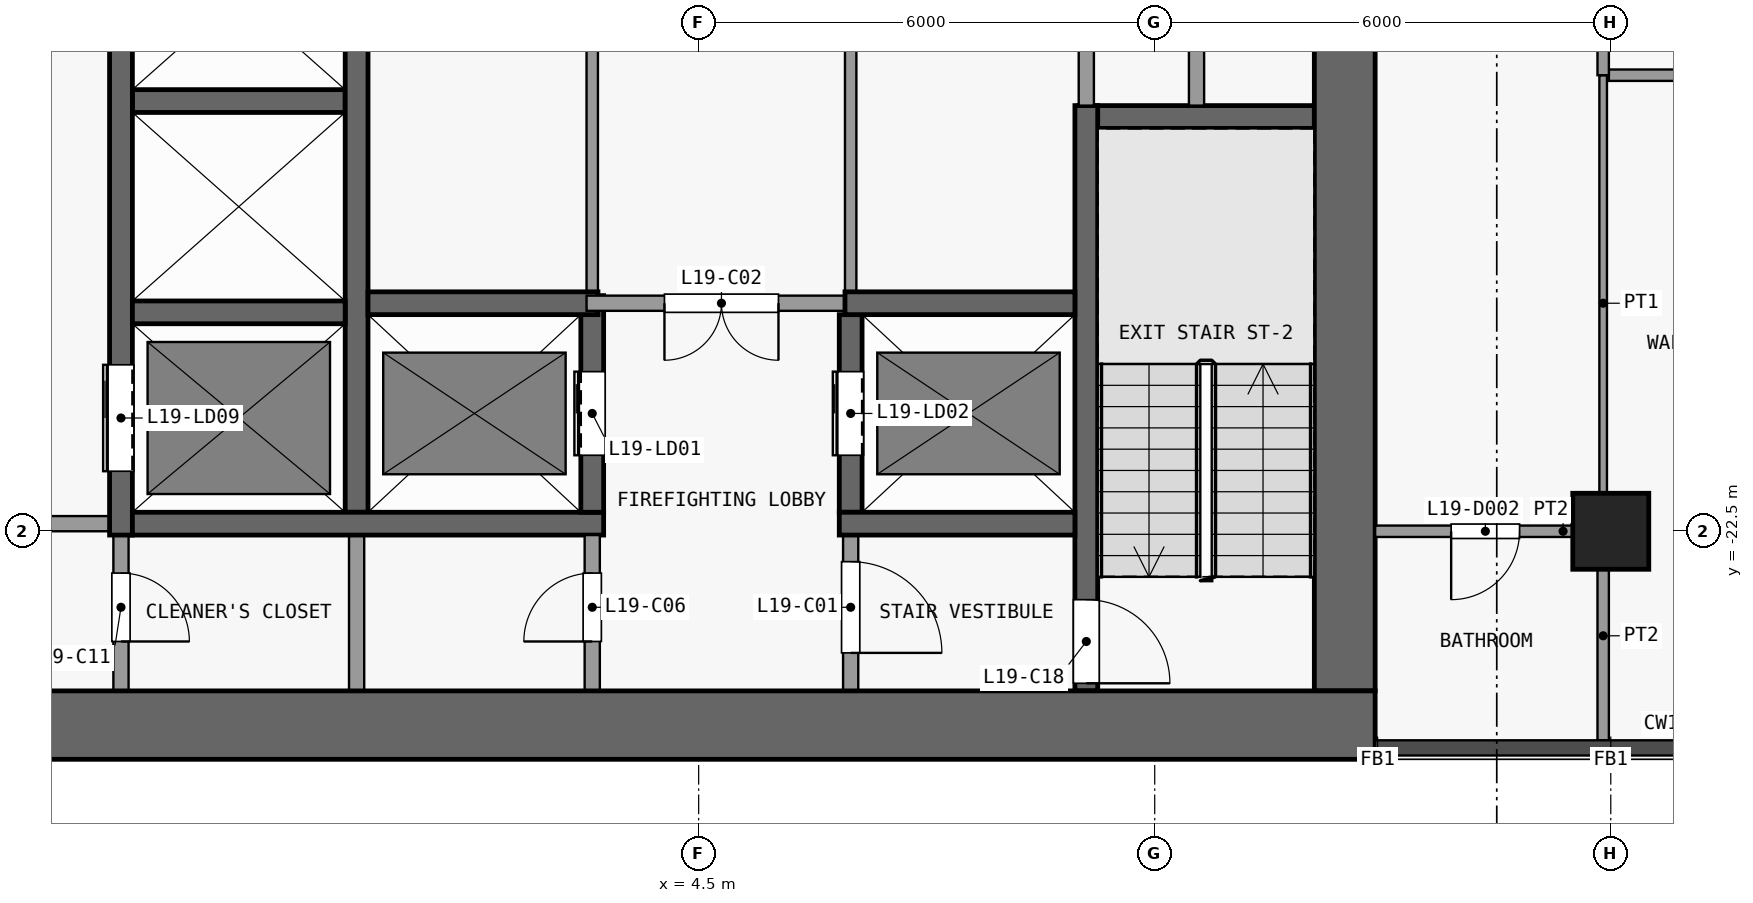
"""IFC4 building model, lengths in metres.
Left out: names, types, materials, properties, quantities, classifications, styles, units other than length and angle.
Written with IfcOpenShell. Run it as: python <this file> out.ifc"""

import sys

from ifc_helpers import new_model, si_unit, direction, frame, frame_2d, origin, origin_2d, place, context, subcontext, project, spatial, rectangle, extrude, element, fill, save


model = new_model("IFC4")
c1 = context("Model", 3, precision=1e-05, world=origin(), true_north=direction((0.0, 1.0)))
c2 = subcontext(c1, "Body", "Model", "MODEL_VIEW")
j1 = project(units=[si_unit("LENGTHUNIT", "METRE"), si_unit("PLANEANGLEUNIT", "RADIAN")], contexts=[c1])
p1 = place(None, origin())
s1 = spatial("IfcSite", under=j1, at=p1, CompositionType="ELEMENT")
p2 = place(p1, origin())
s2 = spatial("IfcBuilding", under=s1, at=p2, CompositionType="ELEMENT")
p3 = place(p2, frame((0.0, 0.0, 81.1)))
s3 = spatial("IfcBuildingStorey", under=s2, at=p3, CompositionType="ELEMENT", Elevation=81.1)
p4 = place(p3, frame((16.5, -22.5, 0.0), z_axis=(0.0, 0.0, 1.0), x_axis=(1.0, 0.0, 0.0)))
e1 = element("IfcColumn", 1, at=p4, inside=s3, PredefinedType="COLUMN", context=c2, shape_type="SweptSolid", body=[
    extrude(rectangle(XDim=1.0, YDim=1.0, at=origin_2d()), origin(), (0.0, 0.0, 1.0), 3.6),
])
p5 = place(p3, frame((-13.4, -25.05, 0.0), z_axis=(0.0, 0.0, 1.0), x_axis=(1.0, 0.0, 0.0)))
e2 = element("IfcWall", 2, at=p5, inside=s3, PredefinedType="SHEAR", context=c2, shape_type="SweptSolid", body=[
    extrude(rectangle(XDim=26.8, YDim=0.9, at=frame_2d((13.4, 0.0))), origin(), (0.0, 0.0, 1.0), 3.3),
])
p6 = place(p3, frame((13.0, -24.6, 0.0), z_axis=(0.0, 0.0, 1.0), x_axis=(0.0, 1.0, 0.0)))
e3 = element("IfcWall", 3, at=p6, inside=s3, PredefinedType="SHEAR", context=c2, shape_type="SweptSolid", body=[
    extrude(rectangle(XDim=16.1, YDim=0.8, at=frame_2d((8.05, 0.0))), origin(), (0.0, 0.0, 1.0), 3.3),
])
p7 = place(p3, frame((-3.25, -22.4, 0.0), z_axis=(0.0, 0.0, 1.0), x_axis=(-1.0, 0.0, 0.0)))
e4 = element("IfcWall", 4, at=p7, inside=s3, PredefinedType="PARTITIONING", context=c2, shape_type="SweptSolid", body=[
    extrude(rectangle(XDim=3.1, YDim=0.2, at=frame_2d((1.55, 0.0))), origin(), (0.0, 0.0, 1.0), 3.3),
])
p8 = place(p7, frame((0.8, 0.0, 0.0)))
e5 = element("IfcOpeningElement", 5, at=p8, cuts=e4, PredefinedType="OPENING", context=c2, shape_type="SweptSolid", body=[
    extrude(rectangle(XDim=1.5, YDim=2.1, at=frame_2d((0.75, 1.05))), frame((0.0, 0.11, 0.0), z_axis=(0.0, -1.0, 0.0), x_axis=(1.0, 0.0, 0.0)), (0.0, 0.0, 1.0), 0.22),
])
p9 = place(p3, frame((-2.95, -22.4, 0.0), z_axis=(0.0, 0.0, 1.0), x_axis=(1.0, 0.0, 0.0)))
e6 = element("IfcWall", 6, at=p9, inside=s3, PredefinedType="SHEAR", context=c2, shape_type="SweptSolid", body=[
    extrude(rectangle(XDim=6.2, YDim=0.3, at=frame_2d((3.1, 0.0))), origin(), (0.0, 0.0, 1.0), 3.3),
])
p10 = place(p3, frame((6.35, -22.4, 0.0), z_axis=(0.0, 0.0, 1.0), x_axis=(1.0, 0.0, 0.0)))
e7 = element("IfcWall", 7, at=p10, inside=s3, PredefinedType="SHEAR", context=c2, shape_type="SweptSolid", body=[
    extrude(rectangle(XDim=3.1, YDim=0.3, at=frame_2d((1.55, 0.0))), origin(), (0.0, 0.0, 1.0), 3.3),
])
p11 = place(p3, frame((-2.95, -19.62, 0.0), z_axis=(0.0, 0.0, 1.0), x_axis=(1.0, 0.0, 0.0)))
e8 = element("IfcWall", 8, at=p11, inside=s3, PredefinedType="SHEAR", context=c2, shape_type="SweptSolid", body=[
    extrude(rectangle(XDim=2.8, YDim=0.3, at=frame_2d((1.4, 0.0))), origin(), (0.0, 0.0, 1.0), 3.3),
])
p12 = place(p3, frame((0.15, -19.5, 0.0), z_axis=(0.0, 0.0, 1.0), x_axis=(1.0, 0.0, 0.0)))
e9 = element("IfcWall", 9, at=p12, inside=s3, PredefinedType="SHEAR", context=c2, shape_type="SweptSolid", body=[
    extrude(rectangle(XDim=3.025, YDim=0.3, at=frame_2d((1.513, 0.0))), origin(), (0.0, 0.0, 1.0), 3.3),
])
p13 = place(p3, frame((6.575, -19.5, 0.0), z_axis=(0.0, 0.0, 1.0), x_axis=(-1.0, 0.0, 0.0)))
e10 = element("IfcWall", 10, at=p13, inside=s3, PredefinedType="PARTITIONING", context=c2, shape_type="SweptSolid", body=[
    extrude(rectangle(XDim=3.55, YDim=0.2, at=frame_2d((1.775, 0.0))), origin(), (0.0, 0.0, 1.0), 3.3),
])
p14 = place(p13, frame((1.025, 0.0, 0.0)))
e11 = element("IfcOpeningElement", 11, at=p14, cuts=e10, PredefinedType="OPENING", context=c2, shape_type="SweptSolid", body=[
    extrude(rectangle(XDim=1.5, YDim=2.1, at=frame_2d((0.75, 1.05))), frame((0.0, 0.11, 0.0), z_axis=(0.0, -1.0, 0.0), x_axis=(1.0, 0.0, 0.0)), (0.0, 0.0, 1.0), 0.22),
])
p15 = place(p3, frame((6.425, -19.5, 0.0), z_axis=(0.0, 0.0, 1.0), x_axis=(1.0, 0.0, 0.0)))
e12 = element("IfcWall", 12, at=p15, inside=s3, PredefinedType="SHEAR", context=c2, shape_type="SweptSolid", body=[
    extrude(rectangle(XDim=3.025, YDim=0.3, at=frame_2d((1.512, 0.0))), origin(), (0.0, 0.0, 1.0), 3.3),
])
p16 = place(p3, frame((9.5, -17.05, 0.0), z_axis=(0.0, 0.0, 1.0), x_axis=(1.0, 0.0, 0.0)))
e13 = element("IfcWall", 13, at=p16, inside=s3, PredefinedType="SHEAR", context=c2, shape_type="SweptSolid", body=[
    extrude(rectangle(XDim=3.1, YDim=0.3, at=frame_2d((1.55, 0.0))), origin(), (0.0, 0.0, 1.0), 3.3),
])
p17 = place(p3, frame((-2.95, -16.84, 0.0), z_axis=(0.0, 0.0, 1.0), x_axis=(1.0, 0.0, 0.0)))
e14 = element("IfcWall", 14, at=p17, inside=s3, PredefinedType="SHEAR", context=c2, shape_type="SweptSolid", body=[
    extrude(rectangle(XDim=2.8, YDim=0.3, at=frame_2d((1.4, 0.0))), origin(), (0.0, 0.0, 1.0), 3.3),
])
p18 = place(p3, frame((-3.1, -22.55, 0.0), z_axis=(0.0, 0.0, 1.0), x_axis=(0.0, -1.0, 0.0)))
e15 = element("IfcWall", 15, at=p18, inside=s3, PredefinedType="PARTITIONING", context=c2, shape_type="SweptSolid", body=[
    extrude(rectangle(XDim=2.05, YDim=0.2, at=frame_2d((1.025, 0.0))), origin(), (0.0, 0.0, 1.0), 3.3),
])
p19 = place(p18, frame((0.5, 0.0, 0.0)))
e16 = element("IfcOpeningElement", 16, at=p19, cuts=e15, PredefinedType="OPENING", context=c2, shape_type="SweptSolid", body=[
    extrude(rectangle(XDim=0.9, YDim=2.1, at=frame_2d((0.45, 1.05))), frame((0.0, 0.11, 0.0), z_axis=(0.0, -1.0, 0.0), x_axis=(1.0, 0.0, 0.0)), (0.0, 0.0, 1.0), 0.22),
])
p20 = place(p3, frame((-3.1, -22.55, 0.0), z_axis=(0.0, 0.0, 1.0), x_axis=(0.0, 1.0, 0.0)))
e17 = element("IfcWall", 17, at=p20, inside=s3, PredefinedType="SHEAR", context=c2, shape_type="SweptSolid", body=[
    extrude(rectangle(XDim=14.05, YDim=0.3, at=frame_2d((7.025, 0.0))), origin(), (0.0, 0.0, 1.0), 3.3),
])
p21 = place(p20, frame((12.11, 0.0, 0.0)))
e18 = element("IfcOpeningElement", 18, at=p21, cuts=e17, PredefinedType="OPENING", context=c2, shape_type="SweptSolid", body=[
    extrude(rectangle(XDim=1.1, YDim=2.1, at=frame_2d((0.55, 1.05))), frame((0.0, 0.16, 0.0), z_axis=(0.0, -1.0, 0.0), x_axis=(1.0, 0.0, 0.0)), (0.0, 0.0, 1.0), 0.32),
])
p22 = place(p20, frame((0.84, 0.0, 0.0)))
e19 = element("IfcOpeningElement", 19, at=p22, cuts=e17, PredefinedType="OPENING", context=c2, shape_type="SweptSolid", body=[
    extrude(rectangle(XDim=1.4, YDim=2.1, at=frame_2d((0.7, 1.05))), frame((0.0, 0.16, 0.0), z_axis=(0.0, -1.0, 0.0), x_axis=(1.0, 0.0, 0.0)), (0.0, 0.0, 1.0), 0.32),
])
p23 = place(p3, frame((0.0, -24.6, 0.0), z_axis=(0.0, 0.0, 1.0), x_axis=(0.0, 1.0, 0.0)))
e20 = element("IfcWall", 20, at=p23, inside=s3, PredefinedType="PARTITIONING", context=c2, shape_type="SweptSolid", body=[
    extrude(rectangle(XDim=2.05, YDim=0.2, at=frame_2d((1.025, 0.0))), origin(), (0.0, 0.0, 1.0), 3.3),
])
p24 = place(p3, frame((0.0, -22.25, 0.0), z_axis=(0.0, 0.0, 1.0), x_axis=(0.0, 1.0, 0.0)))
e21 = element("IfcWall", 21, at=p24, inside=s3, PredefinedType="SHEAR", context=c2, shape_type="SweptSolid", body=[
    extrude(rectangle(XDim=13.75, YDim=0.3, at=frame_2d((6.875, 0.0))), origin(), (0.0, 0.0, 1.0), 3.3),
])
p25 = place(p3, frame((3.1, -24.6, 0.0), z_axis=(0.0, 0.0, 1.0), x_axis=(0.0, 1.0, 0.0)))
e22 = element("IfcWall", 22, at=p25, inside=s3, PredefinedType="PARTITIONING", context=c2, shape_type="SweptSolid", body=[
    extrude(rectangle(XDim=2.05, YDim=0.2, at=frame_2d((1.025, 0.0))), origin(), (0.0, 0.0, 1.0), 3.3),
])
p26 = place(p25, frame((0.65, 0.0, 0.0)))
e23 = element("IfcOpeningElement", 23, at=p26, cuts=e22, PredefinedType="OPENING", context=c2, shape_type="SweptSolid", body=[
    extrude(rectangle(XDim=0.9, YDim=2.1, at=frame_2d((0.45, 1.05))), frame((0.0, 0.11, 0.0), z_axis=(0.0, -1.0, 0.0), x_axis=(1.0, 0.0, 0.0)), (0.0, 0.0, 1.0), 0.22),
])
p27 = place(p3, frame((3.1, -22.25, 0.0), z_axis=(0.0, 0.0, 1.0), x_axis=(0.0, 1.0, 0.0)))
e24 = element("IfcWall", 24, at=p27, inside=s3, PredefinedType="SHEAR", context=c2, shape_type="SweptSolid", body=[
    extrude(rectangle(XDim=2.85, YDim=0.3, at=frame_2d((1.425, 0.0))), origin(), (0.0, 0.0, 1.0), 3.3),
])
p28 = place(p27, frame((0.75, 0.0, 0.0)))
e25 = element("IfcOpeningElement", 25, at=p28, cuts=e24, PredefinedType="OPENING", context=c2, shape_type="SweptSolid", body=[
    extrude(rectangle(XDim=1.1, YDim=2.1, at=frame_2d((0.55, 1.05))), frame((0.0, 0.16, 0.0), z_axis=(0.0, -1.0, 0.0), x_axis=(1.0, 0.0, 0.0)), (0.0, 0.0, 1.0), 0.32),
])
p29 = place(p3, frame((3.1, -19.4, 0.0), z_axis=(0.0, 0.0, 1.0), x_axis=(0.0, 1.0, 0.0)))
e26 = element("IfcWall", 26, at=p29, inside=s3, PredefinedType="PARTITIONING", context=c2, shape_type="SweptSolid", body=[
    extrude(rectangle(XDim=10.9, YDim=0.15, at=frame_2d((5.45, 0.0))), origin(), (0.0, 0.0, 1.0), 3.3),
])
p30 = place(p29, frame((4.8, 0.0, 0.0)))
e27 = element("IfcOpeningElement", 27, at=p30, cuts=e26, PredefinedType="OPENING", context=c2, shape_type="SweptSolid", body=[
    extrude(rectangle(XDim=1.2, YDim=2.1, at=frame_2d((0.6, 1.05))), frame((0.0, 0.085, 0.0), z_axis=(0.0, -1.0, 0.0), x_axis=(1.0, 0.0, 0.0)), (0.0, 0.0, 1.0), 0.17),
])
p31 = place(p3, frame((6.5, -22.55, 0.0), z_axis=(0.0, 0.0, 1.0), x_axis=(0.0, -1.0, 0.0)))
e28 = element("IfcWall", 28, at=p31, inside=s3, PredefinedType="PARTITIONING", context=c2, shape_type="SweptSolid", body=[
    extrude(rectangle(XDim=2.05, YDim=0.2, at=frame_2d((1.025, 0.0))), origin(), (0.0, 0.0, 1.0), 3.3),
])
p32 = place(p31, frame((0.35, 0.0, 0.0)))
e29 = element("IfcOpeningElement", 29, at=p32, cuts=e28, PredefinedType="OPENING", context=c2, shape_type="SweptSolid", body=[
    extrude(rectangle(XDim=1.2, YDim=2.1, at=frame_2d((0.6, 1.05))), frame((0.0, 0.11, 0.0), z_axis=(0.0, -1.0, 0.0), x_axis=(1.0, 0.0, 0.0)), (0.0, 0.0, 1.0), 0.22),
])
p33 = place(p3, frame((6.5, -22.25, 0.0), z_axis=(0.0, 0.0, 1.0), x_axis=(0.0, 1.0, 0.0)))
e30 = element("IfcWall", 30, at=p33, inside=s3, PredefinedType="SHEAR", context=c2, shape_type="SweptSolid", body=[
    extrude(rectangle(XDim=2.6, YDim=0.3, at=frame_2d((1.3, 0.0))), origin(), (0.0, 0.0, 1.0), 3.3),
])
p34 = place(p33, frame((0.75, 0.0, 0.0)))
e31 = element("IfcOpeningElement", 31, at=p34, cuts=e30, PredefinedType="OPENING", context=c2, shape_type="SweptSolid", body=[
    extrude(rectangle(XDim=1.1, YDim=2.1, at=frame_2d((0.55, 1.05))), frame((0.0, 0.16, 0.0), z_axis=(0.0, -1.0, 0.0), x_axis=(1.0, 0.0, 0.0)), (0.0, 0.0, 1.0), 0.32),
])
p35 = place(p3, frame((6.5, -8.5, 0.0), z_axis=(0.0, 0.0, 1.0), x_axis=(0.0, -1.0, 0.0)))
e32 = element("IfcWall", 32, at=p35, inside=s3, PredefinedType="PARTITIONING", context=c2, shape_type="SweptSolid", body=[
    extrude(rectangle(XDim=10.85, YDim=0.15, at=frame_2d((5.425, 0.0))), origin(), (0.0, 0.0, 1.0), 3.3),
])
p36 = place(p35, frame((6.275, 0.0, 0.0)))
e33 = element("IfcOpeningElement", 33, at=p36, cuts=e32, PredefinedType="OPENING", context=c2, shape_type="SweptSolid", body=[
    extrude(rectangle(XDim=1.2, YDim=2.1, at=frame_2d((0.6, 1.05))), frame((0.0, 0.085, 0.0), z_axis=(0.0, -1.0, 0.0), x_axis=(1.0, 0.0, 0.0)), (0.0, 0.0, 1.0), 0.17),
])
p37 = place(p35, frame((0.925, 0.0, 0.0)))
e34 = element("IfcOpeningElement", 34, at=p37, cuts=e32, PredefinedType="OPENING", context=c2, shape_type="SweptSolid", body=[
    extrude(rectangle(XDim=0.9, YDim=2.1, at=frame_2d((0.45, 1.05))), frame((0.0, 0.085, 0.0), z_axis=(0.0, -1.0, 0.0), x_axis=(1.0, 0.0, 0.0)), (0.0, 0.0, 1.0), 0.17),
])
p38 = place(p3, frame((9.6, -16.9, 0.0), z_axis=(0.0, 0.0, 1.0), x_axis=(0.0, -1.0, 0.0)))
e35 = element("IfcWall", 35, at=p38, inside=s3, PredefinedType="SHEAR", context=c2, shape_type="SweptSolid", body=[
    extrude(rectangle(XDim=7.7, YDim=0.3, at=frame_2d((3.85, 0.0))), origin(), (0.0, 0.0, 1.0), 3.3),
])
p39 = place(p38, frame((6.5, 0.0, 0.0)))
e36 = element("IfcOpeningElement", 36, at=p39, cuts=e35, PredefinedType="OPENING", context=c2, shape_type="SweptSolid", body=[
    extrude(rectangle(XDim=1.1, YDim=2.1, at=frame_2d((0.55, 1.05))), frame((0.0, 0.16, 0.0), z_axis=(0.0, -1.0, 0.0), x_axis=(1.0, 0.0, 0.0)), (0.0, 0.0, 1.0), 0.32),
])
p40 = place(p3, frame((9.6, -16.9, 0.0), z_axis=(0.0, 0.0, 1.0), x_axis=(0.0, 1.0, 0.0)))
e37 = element("IfcWall", 37, at=p40, inside=s3, PredefinedType="PARTITIONING", context=c2, shape_type="SweptSolid", body=[
    extrude(rectangle(XDim=8.4, YDim=0.2, at=frame_2d((4.2, 0.0))), origin(), (0.0, 0.0, 1.0), 3.3),
])
p41 = place(p3, frame((11.05, -11.2, 0.0), z_axis=(0.0, 0.0, 1.0), x_axis=(0.0, -1.0, 0.0)))
e38 = element("IfcWall", 38, at=p41, inside=s3, PredefinedType="PARTITIONING", context=c2, shape_type="SweptSolid", body=[
    extrude(rectangle(XDim=5.7, YDim=0.2, at=frame_2d((2.85, 0.0))), origin(), (0.0, 0.0, 1.0), 3.3),
])
p42 = place(p41, frame((2.525, 0.0, 0.0)))
e39 = element("IfcOpeningElement", 39, at=p42, cuts=e38, PredefinedType="OPENING", context=c2, shape_type="SweptSolid", body=[
    extrude(rectangle(XDim=0.9, YDim=2.1, at=frame_2d((0.45, 1.05))), frame((0.0, 0.11, 0.0), z_axis=(0.0, -1.0, 0.0), x_axis=(1.0, 0.0, 0.0)), (0.0, 0.0, 1.0), 0.22),
])
p43 = place(p3, frame((13.4, -22.5, 0.0), z_axis=(0.0, 0.0, 1.0), x_axis=(1.0, 0.0, 0.0)))
e40 = element("IfcWall", 40, at=p43, inside=s3, PredefinedType="PARTITIONING", context=c2, shape_type="SweptSolid", body=[
    extrude(rectangle(XDim=2.925, YDim=0.15, at=frame_2d((1.462, 0.0))), origin(), (0.0, 0.0, 1.0), 3.3),
])
p44 = place(p43, frame((1.0, 0.0, 0.0)))
e41 = element("IfcOpeningElement", 41, at=p44, cuts=e40, PredefinedType="OPENING", context=c2, shape_type="SweptSolid", body=[
    extrude(rectangle(XDim=0.9, YDim=2.1, at=frame_2d((0.45, 1.05))), frame((0.0, 0.085, 0.0), z_axis=(0.0, -1.0, 0.0), x_axis=(1.0, 0.0, 0.0)), (0.0, 0.0, 1.0), 0.17),
])
p45 = place(p3, frame((16.475, -16.5, 0.0), z_axis=(0.0, 0.0, 1.0), x_axis=(1.0, 0.0, 0.0)))
e42 = element("IfcWall", 42, at=p45, inside=s3, PredefinedType="PARTITIONING", context=c2, shape_type="SweptSolid", body=[
    extrude(rectangle(XDim=3.45, YDim=0.15, at=frame_2d((1.725, 0.0))), origin(), (0.0, 0.0, 1.0), 3.3),
])
p46 = place(p3, frame((16.4, -22.5, 0.0), z_axis=(0.0, 0.0, 1.0), x_axis=(0.0, 1.0, 0.0)))
e43 = element("IfcWall", 43, at=p46, inside=s3, PredefinedType="PARTITIONING", context=c2, shape_type="SweptSolid", body=[
    extrude(rectangle(XDim=6.0, YDim=0.1, at=frame_2d((3.0, 0.0))), origin(), (0.0, 0.0, 1.0), 3.3),
])
p47 = place(p3, frame((16.4, -25.25, 0.0), z_axis=(0.0, 0.0, 1.0), x_axis=(0.0, 1.0, 0.0)))
e44 = element("IfcWall", 44, at=p47, inside=s3, PredefinedType="PARTITIONING", context=c2, shape_type="SweptSolid", body=[
    extrude(rectangle(XDim=2.75, YDim=0.15, at=frame_2d((1.375, 0.0))), origin(), (0.0, 0.0, 1.0), 3.3),
])
p48 = place(p3, frame((16.4, -16.5, 0.0), z_axis=(0.0, 0.0, 1.0), x_axis=(0.0, 1.0, 0.0)))
e45 = element("IfcWall", 45, at=p48, inside=s3, PredefinedType="PARTITIONING", context=c2, shape_type="SweptSolid", body=[
    extrude(rectangle(XDim=8.5, YDim=0.15, at=frame_2d((4.25, 0.0))), origin(), (0.0, 0.0, 1.0), 3.3),
])
p49 = place(p48, frame((5.3, 0.0, 0.0)))
e46 = element("IfcOpeningElement", 46, at=p49, cuts=e45, PredefinedType="OPENING", context=c2, shape_type="SweptSolid", body=[
    extrude(rectangle(XDim=0.9, YDim=2.1, at=frame_2d((0.45, 1.05))), frame((0.0, 0.085, 0.0), z_axis=(0.0, -1.0, 0.0), x_axis=(1.0, 0.0, 0.0)), (0.0, 0.0, 1.0), 0.17),
])
p50 = place(p28, origin())
e47 = element("IfcDoor", 47, at=p50, inside=s3, OperationType="DOUBLE_DOOR_SLIDING", PredefinedType="DOOR", context=c2, shape_type="SweptSolid", body=[
    extrude(rectangle(XDim=1.1, YDim=2.1, at=frame_2d((0.55, 1.05))), frame((0.0, 0.025, 0.0), z_axis=(0.0, -1.0, 0.0), x_axis=(1.0, 0.0, 0.0)), (0.0, 0.0, 1.0), 0.05),
])
fill(e25, e47)
p51 = place(p34, origin())
e48 = element("IfcDoor", 48, at=p51, inside=s3, OperationType="DOUBLE_DOOR_SLIDING", PredefinedType="DOOR", context=c2, shape_type="SweptSolid", body=[
    extrude(rectangle(XDim=1.1, YDim=2.1, at=frame_2d((0.55, 1.05))), frame((0.0, 0.025, 0.0), z_axis=(0.0, -1.0, 0.0), x_axis=(1.0, 0.0, 0.0)), (0.0, 0.0, 1.0), 0.05),
])
fill(e31, e48)
p52 = place(p22, origin())
e49 = element("IfcDoor", 49, at=p52, inside=s3, OperationType="DOUBLE_DOOR_SLIDING", PredefinedType="DOOR", context=c2, shape_type="SweptSolid", body=[
    extrude(rectangle(XDim=1.4, YDim=2.1, at=frame_2d((0.7, 1.05))), frame((0.0, 0.025, 0.0), z_axis=(0.0, -1.0, 0.0), x_axis=(1.0, 0.0, 0.0)), (0.0, 0.0, 1.0), 0.05),
])
fill(e19, e49)
p53 = place(p32, origin())
e50 = element("IfcDoor", 50, at=p53, inside=s3, OperationType="SINGLE_SWING_RIGHT", PredefinedType="DOOR", context=c2, shape_type="SweptSolid", body=[
    extrude(rectangle(XDim=1.2, YDim=2.1, at=frame_2d((0.6, 1.05))), frame((0.0, 0.025, 0.0), z_axis=(0.0, -1.0, 0.0), x_axis=(1.0, 0.0, 0.0)), (0.0, 0.0, 1.0), 0.05),
])
fill(e29, e50)
p54 = place(p14, origin())
e51 = element("IfcDoor", 51, at=p54, inside=s3, OperationType="DOUBLE_DOOR_SINGLE_SWING", PredefinedType="DOOR", context=c2, shape_type="SweptSolid", body=[
    extrude(rectangle(XDim=1.5, YDim=2.1, at=frame_2d((0.75, 1.05))), frame((0.0, 0.025, 0.0), z_axis=(0.0, -1.0, 0.0), x_axis=(1.0, 0.0, 0.0)), (0.0, 0.0, 1.0), 0.05),
])
fill(e11, e51)
p55 = place(p26, origin())
e52 = element("IfcDoor", 52, at=p55, inside=s3, OperationType="SINGLE_SWING_LEFT", PredefinedType="DOOR", context=c2, shape_type="SweptSolid", body=[
    extrude(rectangle(XDim=0.9, YDim=2.1, at=frame_2d((0.45, 1.05))), frame((0.0, 0.025, 0.0), z_axis=(0.0, -1.0, 0.0), x_axis=(1.0, 0.0, 0.0)), (0.0, 0.0, 1.0), 0.05),
])
fill(e23, e52)
p56 = place(p19, origin())
e53 = element("IfcDoor", 53, at=p56, inside=s3, OperationType="SINGLE_SWING_RIGHT", PredefinedType="DOOR", context=c2, shape_type="SweptSolid", body=[
    extrude(rectangle(XDim=0.9, YDim=2.1, at=frame_2d((0.45, 1.05))), frame((0.0, 0.025, 0.0), z_axis=(0.0, -1.0, 0.0), x_axis=(1.0, 0.0, 0.0)), (0.0, 0.0, 1.0), 0.05),
])
fill(e16, e53)
p57 = place(p39, origin())
e54 = element("IfcDoor", 54, at=p57, inside=s3, OperationType="SINGLE_SWING_RIGHT", PredefinedType="DOOR", context=c2, shape_type="SweptSolid", body=[
    extrude(rectangle(XDim=1.1, YDim=2.1, at=frame_2d((0.55, 1.05))), frame((0.0, 0.025, 0.0), z_axis=(0.0, -1.0, 0.0), x_axis=(1.0, 0.0, 0.0)), (0.0, 0.0, 1.0), 0.05),
])
fill(e36, e54)
p58 = place(p44, origin())
e55 = element("IfcDoor", 55, at=p58, inside=s3, OperationType="SINGLE_SWING_LEFT", PredefinedType="DOOR", context=c2, shape_type="SweptSolid", body=[
    extrude(rectangle(XDim=0.9, YDim=2.1, at=frame_2d((0.45, 1.05))), frame((0.0, 0.025, 0.0), z_axis=(0.0, -1.0, 0.0), x_axis=(1.0, 0.0, 0.0)), (0.0, 0.0, 1.0), 0.05),
])
fill(e41, e55)
save(model, sys.argv[1])
